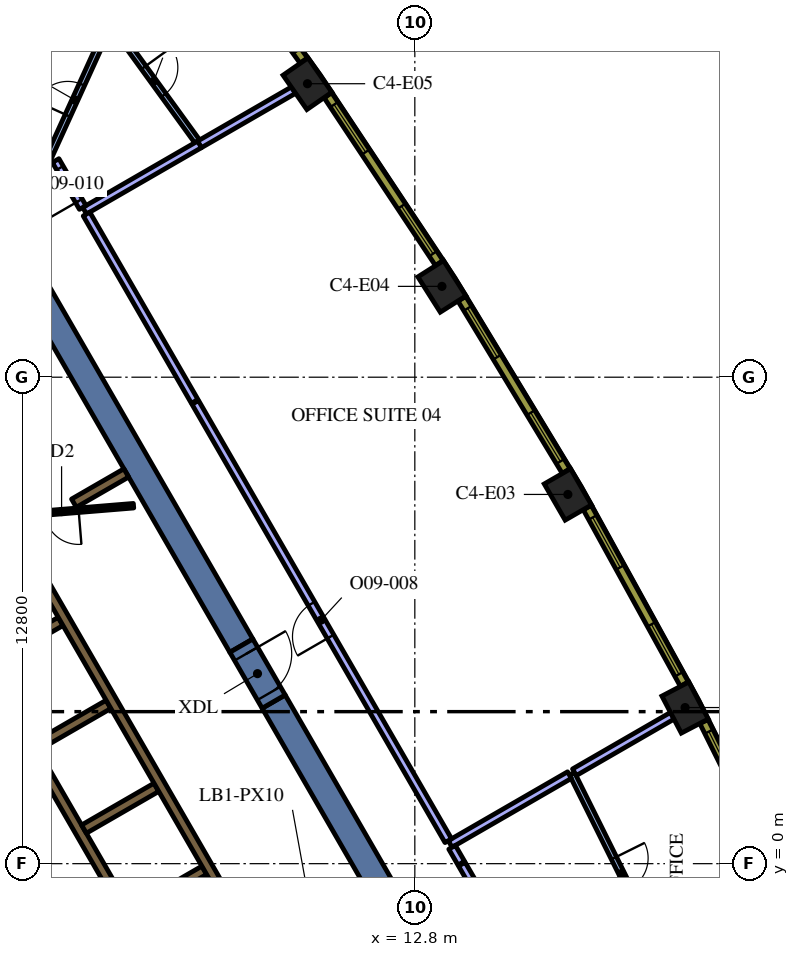
"""IFC4 building model, lengths in metres.
Left out: names, types, materials, properties, quantities, classifications, styles, units other than length and angle.
Written with IfcOpenShell. Run it as: python <this file> out.ifc"""

import sys

from ifc_helpers import new_model, si_unit, direction, frame, frame_2d, origin, origin_2d, place, context, subcontext, project, spatial, rectangle, extrude, element, fill, save


model = new_model("IFC4")
c1 = context("Model", 3, precision=1e-05, world=origin(), true_north=direction((0.0, 1.0)))
c2 = subcontext(c1, "Body", "Model", "MODEL_VIEW")
j1 = project(units=[si_unit("LENGTHUNIT", "METRE"), si_unit("PLANEANGLEUNIT", "RADIAN")], contexts=[c1])
p1 = place(None, origin())
s1 = spatial("IfcSite", under=j1, at=p1, CompositionType="ELEMENT")
p2 = place(p1, origin())
s2 = spatial("IfcBuilding", under=s1, at=p2, CompositionType="ELEMENT")
p3 = place(p2, frame((0.0, 0.0, 239.4)))
s3 = spatial("IfcBuildingStorey", under=s2, at=p3, CompositionType="ELEMENT", Elevation=239.4)
for number, where, z_axis, x_axis in (
    (1, (19.912, 4.108, 0.0), (0.0, 0.0, 1.0), (-0.464, 0.886, 0.0)),
    (2, (16.827, 9.715, 0.0), (0.0, 0.0, 1.0), (-0.5, 0.866, 0.0)),
    (3, (13.513, 15.19, 0.0), (0.0, 0.0, 1.0), (-0.536, 0.845, 0.0)),
    (4, (9.975, 20.522, 0.0), (0.0, 0.0, 1.0), (-0.57, 0.822, 0.0)),
):
    element("IfcColumn", number, at=place(p3, frame(where, z_axis=z_axis, x_axis=x_axis)), inside=s3, PredefinedType="COLUMN", context=c2, shape_type="SweptSolid", body=[
        extrude(rectangle(XDim=1.1, YDim=0.8, at=origin_2d()), origin(), (0.0, 0.0, 1.0), 4.2),
    ])
for number, where, z_axis, x_axis in (
    (5, (9.085, 4.264, 0.0), (0.0, 0.0, 1.0), (0.5, -0.866, 0.0)),
    (6, (8.235, 5.736, 0.0), (0.0, 0.0, 1.0), (-0.5, 0.866, 0.0)),
):
    element("IfcWall", number, at=place(p3, frame(where, z_axis=z_axis, x_axis=x_axis)), inside=s3, PredefinedType="SOLIDWALL", context=c2, shape_type="SweptSolid", body=[
        extrude(rectangle(XDim=12.472, YDim=0.7, at=frame_2d((6.236, 0.0))), origin(), (0.0, 0.0, 1.0), 4.2),
    ])
p4 = place(p3, frame((6.568, -3.627, 0.0), z_axis=(0.0, 0.0, 1.0), x_axis=(-0.499999455981, 0.866025717874, 0.0)))
e7 = element("IfcWall", 7, at=p4, inside=s3, PredefinedType="SOLIDWALL", context=c2, shape_type="SweptSolid", body=[
    extrude(rectangle(XDim=11.978, YDim=0.25, at=frame_2d((5.989, 0.0))), origin(), (0.0, 0.0, 1.0), 4.2),
])
p5 = place(p3, frame((1.574, 5.274, 0.0), z_axis=(0.0, 0.0, 1.0), x_axis=(0.866028486751, 0.499994660107, 0.0)))
e8 = element("IfcWall", 8, at=p5, inside=s3, PredefinedType="SOLIDWALL", context=c2, shape_type="SweptSolid", body=[
    extrude(rectangle(XDim=2.2, YDim=0.25, at=frame_2d((1.1, 0.0))), origin(), (0.0, 0.0, 1.0), 4.2),
])
for number, where, z_axis, x_axis in (
    (9, (2.834, 3.091, 0.0), (0.0, 0.0, 1.0), (0.866, 0.5, 0.0)),
    (10, (4.094, 0.909, 0.0), (0.0, 0.0, 1.0), (0.866, 0.5, 0.0)),
    (11, (5.354, -1.274, 0.0), (0.0, 0.0, 1.0), (0.866, 0.5, 0.0)),
):
    element("IfcWall", number, at=place(p3, frame(where, z_axis=z_axis, x_axis=x_axis)), inside=s3, PredefinedType="SOLIDWALL", context=c2, shape_type="SweptSolid", body=[
        extrude(rectangle(XDim=2.2, YDim=0.25, at=frame_2d((1.1, 0.0))), origin(), (0.0, 0.0, 1.0), 4.2),
    ])
p6 = place(p3, frame((3.83, 9.486, 0.0), z_axis=(0.0, 0.0, 1.0), x_axis=(0.865986202621, 0.500067892261, 0.0)))
e12 = element("IfcWall", 12, at=p6, inside=s3, PredefinedType="SOLIDWALL", context=c2, shape_type="SweptSolid", body=[
    extrude(rectangle(XDim=1.591, YDim=0.25, at=frame_2d((0.795, 0.0))), origin(), (0.0, 0.0, 1.0), 4.2),
])
p7 = place(p3, frame((8.565, -2.185, 0.0), z_axis=(0.0, 0.0, 1.0), x_axis=(-0.499997954832, 0.866026584559, 0.0)))
e13 = element("IfcWall", 13, at=p7, inside=s3, PredefinedType="SOLIDWALL", context=c2, shape_type="SweptSolid", body=[
    extrude(rectangle(XDim=12.35, YDim=0.25, at=frame_2d((6.175, 0.0))), origin(), (0.0, 0.0, 1.0), 4.2),
])
p8 = place(p7, frame((0.585, 0.0, 0.0)))
e14 = element("IfcOpeningElement", 14, at=p8, cuts=e13, PredefinedType="OPENING", context=c2, shape_type="SweptSolid", body=[
    extrude(rectangle(XDim=1.1, YDim=2.1, at=frame_2d((0.55, 1.05))), frame((0.0, 0.135, 0.0), z_axis=(0.0, -1.0, 0.0), x_axis=(1.0, 0.0, 0.0)), (0.0, 0.0, 1.0), 0.27),
])
p9 = place(p3, frame((5.398, 9.419, 0.0), z_axis=(0.0, 0.0, 1.0), x_axis=(-0.996653416376, -0.081743303248, 0.0)))
e15 = element("IfcWall", 15, at=p9, inside=s3, PredefinedType="PARTITIONING", context=c2, shape_type="SweptSolid", body=[
    extrude(rectangle(XDim=2.7, YDim=0.12, at=frame_2d((1.35, 0.0))), origin(), (0.0, 0.0, 1.0), 3.45),
])
p10 = place(p9, frame((1.45, 0.0, 0.0)))
e16 = element("IfcOpeningElement", 16, at=p10, cuts=e15, PredefinedType="OPENING", context=c2, shape_type="SweptSolid", body=[
    extrude(rectangle(XDim=0.9, YDim=2.1, at=frame_2d((0.45, 1.05))), frame((0.0, 0.07, 0.0), z_axis=(0.0, -1.0, 0.0), x_axis=(1.0, 0.0, 0.0)), (0.0, 0.0, 1.0), 0.14),
])
p11 = place(p3, frame((8.235, 5.736, 0.0), z_axis=(0.0, 0.0, 1.0), x_axis=(0.499954529098, -0.86605165483, 0.0)))
e17 = element("IfcWall", 17, at=p11, inside=s3, PredefinedType="SOLIDWALL", context=c2, shape_type="SweptSolid", body=[
    extrude(rectangle(XDim=1.7, YDim=0.7, at=frame_2d((0.85, 0.0))), origin(), (0.0, 0.0, 1.0), 4.2),
])
p12 = place(p11, frame((0.25, 0.0, 0.0)))
e18 = element("IfcOpeningElement", 18, at=p12, cuts=e17, PredefinedType="OPENING", context=c2, shape_type="SweptSolid", body=[
    extrude(rectangle(XDim=1.2, YDim=2.1, at=frame_2d((0.6, 1.05))), frame((0.0, 0.36, 0.0), z_axis=(0.0, -1.0, 0.0), x_axis=(1.0, 0.0, 0.0)), (0.0, 0.0, 1.0), 0.72),
])
p13 = place(p3, frame((16.935, 2.368, 0.0), z_axis=(0.0, 0.0, 1.0), x_axis=(0.445153322039, -0.895454365045, 0.0)))
e19 = element("IfcWall", 19, at=p13, inside=s3, PredefinedType="PARTITIONING", context=c2, shape_type="SweptSolid", body=[
    extrude(rectangle(XDim=5.881, YDim=0.15, at=frame_2d((2.94, 0.0))), origin(), (0.0, 0.0, 1.0), 3.45),
])
p14 = place(p13, frame((2.481, 0.0, 0.0)))
e20 = element("IfcOpeningElement", 20, at=p14, cuts=e19, PredefinedType="OPENING", context=c2, shape_type="SweptSolid", body=[
    extrude(rectangle(XDim=0.9, YDim=2.1, at=frame_2d((0.45, 1.05))), frame((0.0, 0.085, 0.0), z_axis=(0.0, -1.0, 0.0), x_axis=(1.0, 0.0, 0.0)), (0.0, 0.0, 1.0), 0.17),
])
p15 = place(p3, frame((17.0, 2.406, 0.0), z_axis=(0.0, 0.0, 1.0), x_axis=(0.86605561342, 0.499947671726, 0.0)))
e21 = element("IfcWall", 21, at=p15, inside=s3, PredefinedType="PARTITIONING", context=c2, shape_type="SweptSolid", body=[
    extrude(rectangle(XDim=2.971, YDim=0.2, at=frame_2d((1.486, 0.0))), origin(), (0.0, 0.0, 1.0), 3.45),
])
p16 = place(p3, frame((13.731, 0.518, 0.0), z_axis=(0.0, 0.0, 1.0), x_axis=(0.8660128559, 0.500021732944, 0.0)))
e22 = element("IfcWall", 22, at=p16, inside=s3, PredefinedType="PARTITIONING", context=c2, shape_type="SweptSolid", body=[
    extrude(rectangle(XDim=3.625, YDim=0.2, at=frame_2d((1.812, 0.0))), origin(), (0.0, 0.0, 1.0), 3.45),
])
p17 = place(p3, frame((14.022, 0.013, 0.0), z_axis=(0.0, 0.0, 1.0), x_axis=(-0.500159754115, 0.865933150054, 0.0)))
e23 = element("IfcWall", 23, at=p17, inside=s3, PredefinedType="PARTITIONING", context=c2, shape_type="SweptSolid", body=[
    extrude(rectangle(XDim=0.483, YDim=0.2, at=frame_2d((0.242, 0.0))), origin(), (0.0, 0.0, 1.0), 3.45),
])
p18 = place(p3, frame((17.681, -6.324, 0.0), z_axis=(0.0, 0.0, 1.0), x_axis=(-0.50002695829, 0.866009838849, 0.0)))
e24 = element("IfcWall", 24, at=p18, inside=s3, PredefinedType="PARTITIONING", context=c2, shape_type="SweptSolid", body=[
    extrude(rectangle(XDim=7.287, YDim=0.2, at=frame_2d((3.644, 0.0))), origin(), (0.0, 0.0, 1.0), 3.45),
])
p19 = place(p18, frame((3.1, 0.0, 0.0)))
e25 = element("IfcOpeningElement", 25, at=p19, cuts=e24, PredefinedType="OPENING", context=c2, shape_type="SweptSolid", body=[
    extrude(rectangle(XDim=1.0, YDim=2.1, at=frame_2d((0.5, 1.05))), frame((0.0, 0.11, 0.0), z_axis=(0.0, -1.0, 0.0), x_axis=(1.0, 0.0, 0.0)), (0.0, 0.0, 1.0), 0.22),
])
p20 = place(p3, frame((7.128, 18.922, 0.0), z_axis=(0.0, 0.0, 1.0), x_axis=(0.866023575777, 0.500003166188, 0.0)))
e26 = element("IfcWall", 26, at=p20, inside=s3, PredefinedType="PARTITIONING", context=c2, shape_type="SweptSolid", body=[
    extrude(rectangle(XDim=2.861, YDim=0.2, at=frame_2d((1.43, 0.0))), origin(), (0.0, 0.0, 1.0), 3.45),
])
p21 = place(p3, frame((4.111, 17.18, 0.0), z_axis=(0.0, 0.0, 1.0), x_axis=(0.866031916153, 0.499988720078, 0.0)))
e27 = element("IfcWall", 27, at=p21, inside=s3, PredefinedType="PARTITIONING", context=c2, shape_type="SweptSolid", body=[
    extrude(rectangle(XDim=3.492, YDim=0.2, at=frame_2d((1.746, 0.0))), origin(), (0.0, 0.0, 1.0), 3.45),
])
p22 = place(p3, frame((13.681, 0.604, 0.0), z_axis=(0.0, 0.0, 1.0), x_axis=(-0.500001759768, 0.86602438778, 0.0)))
e28 = element("IfcWall", 28, at=p22, inside=s3, PredefinedType="PARTITIONING", context=c2, shape_type="SweptSolid", body=[
    extrude(rectangle(XDim=13.317, YDim=0.2, at=frame_2d((6.658, 0.0))), origin(), (0.0, 0.0, 1.0), 3.45),
])
p23 = place(p22, frame((6.2, 0.0, 0.0)))
e29 = element("IfcOpeningElement", 29, at=p23, cuts=e28, PredefinedType="OPENING", context=c2, shape_type="SweptSolid", body=[
    extrude(rectangle(XDim=1.0, YDim=2.1, at=frame_2d((0.5, 1.05))), frame((0.0, 0.11, 0.0), z_axis=(0.0, -1.0, 0.0), x_axis=(1.0, 0.0, 0.0)), (0.0, 0.0, 1.0), 0.22),
])
p24 = place(p3, frame((7.007, 12.163, 0.0), z_axis=(0.0, 0.0, 1.0), x_axis=(-0.499986040413, 0.866033463206, 0.0)))
e30 = element("IfcWall", 30, at=p24, inside=s3, PredefinedType="PARTITIONING", context=c2, shape_type="SweptSolid", body=[
    extrude(rectangle(XDim=5.693, YDim=0.2, at=frame_2d((2.846, 0.0))), origin(), (0.0, 0.0, 1.0), 3.45),
])
p25 = place(p3, frame((4.791, 22.152, 0.0), z_axis=(0.0, 0.0, 1.0), x_axis=(0.586987127968, -0.809596264567, 0.0)))
e31 = element("IfcWall", 31, at=p25, inside=s3, PredefinedType="PARTITIONING", context=c2, shape_type="SweptSolid", body=[
    extrude(rectangle(XDim=3.887, YDim=0.15, at=frame_2d((1.943, 0.0))), origin(), (0.0, 0.0, 1.0), 3.45),
])
p26 = place(p25, frame((1.487, 0.0, 0.0)))
e32 = element("IfcOpeningElement", 32, at=p26, cuts=e31, PredefinedType="OPENING", context=c2, shape_type="SweptSolid", body=[
    extrude(rectangle(XDim=0.9, YDim=2.1, at=frame_2d((0.45, 1.05))), frame((0.0, 0.085, 0.0), z_axis=(0.0, -1.0, 0.0), x_axis=(1.0, 0.0, 0.0)), (0.0, 0.0, 1.0), 0.17),
])
p27 = place(p3, frame((3.129, 18.5, 0.0), z_axis=(0.0, 0.0, 1.0), x_axis=(0.414332290546, 0.910125679789, 0.0)))
e33 = element("IfcWall", 33, at=p27, inside=s3, PredefinedType="PARTITIONING", context=c2, shape_type="SweptSolid", body=[
    extrude(rectangle(XDim=3.926, YDim=0.15, at=frame_2d((1.963, 0.0))), origin(), (0.0, 0.0, 1.0), 3.45),
])
p28 = place(p27, frame((1.3, 0.0, 0.0)))
e34 = element("IfcOpeningElement", 34, at=p28, cuts=e33, PredefinedType="OPENING", context=c2, shape_type="SweptSolid", body=[
    extrude(rectangle(XDim=0.9, YDim=2.1, at=frame_2d((0.45, 1.05))), frame((0.0, 0.085, 0.0), z_axis=(0.0, -1.0, 0.0), x_axis=(1.0, 0.0, 0.0)), (0.0, 0.0, 1.0), 0.17),
])
p29 = place(p3, frame((4.061, 17.266, 0.0), z_axis=(0.0, 0.0, 1.0), x_axis=(-0.49995489152, 0.866051445611, 0.0)))
e35 = element("IfcWall", 35, at=p29, inside=s3, PredefinedType="PARTITIONING", context=c2, shape_type="SweptSolid", body=[
    extrude(rectangle(XDim=1.425, YDim=0.2, at=frame_2d((0.712, 0.0))), origin(), (0.0, 0.0, 1.0), 3.45),
])
p30 = place(p29, frame((0.2, 0.0, 0.0)))
e36 = element("IfcOpeningElement", 36, at=p30, cuts=e35, PredefinedType="OPENING", context=c2, shape_type="SweptSolid", body=[
    extrude(rectangle(XDim=1.0, YDim=2.1, at=frame_2d((0.5, 1.05))), frame((0.0, 0.11, 0.0), z_axis=(0.0, -1.0, 0.0), x_axis=(1.0, 0.0, 0.0)), (0.0, 0.0, 1.0), 0.22),
])
p31 = place(p3, frame((22.766, -1.005, 0.0), z_axis=(0.0, 0.0, 1.0), x_axis=(-0.445129582031, 0.895466166419, 0.0)))
e37 = element("IfcWall", 37, at=p31, inside=s3, PredefinedType="SOLIDWALL", context=c2, shape_type="SweptSolid", body=[
    extrude(rectangle(XDim=5.298, YDim=0.24, at=frame_2d((2.649, 0.0))), origin(), (0.0, 0.0, 1.0), 3.95),
])
p32 = place(p31, frame((0.295, 0.0, 0.9)))
e38 = element("IfcOpeningElement", 38, at=p32, cuts=e37, PredefinedType="OPENING", context=c2, shape_type="SweptSolid", body=[
    extrude(rectangle(XDim=1.5, YDim=2.55, at=frame_2d((0.75, 1.275))), frame((0.0, 0.13, 0.0), z_axis=(0.0, -1.0, 0.0), x_axis=(1.0, 0.0, 0.0)), (0.0, 0.0, 1.0), 0.26),
])
p33 = place(p31, frame((3.504, 0.0, 0.9)))
e39 = element("IfcOpeningElement", 39, at=p33, cuts=e37, PredefinedType="OPENING", context=c2, shape_type="SweptSolid", body=[
    extrude(rectangle(XDim=1.5, YDim=2.55, at=frame_2d((0.75, 1.275))), frame((0.0, 0.13, 0.0), z_axis=(0.0, -1.0, 0.0), x_axis=(1.0, 0.0, 0.0)), (0.0, 0.0, 1.0), 0.26),
])
p34 = place(p3, frame((19.892, 4.725, 0.0), z_axis=(0.0, 0.0, 1.0), x_axis=(-0.481925825015, 0.876212017256, 0.0)))
e40 = element("IfcWall", 40, at=p34, inside=s3, PredefinedType="SOLIDWALL", context=c2, shape_type="SweptSolid", body=[
    extrude(rectangle(XDim=5.299, YDim=0.24, at=frame_2d((2.649, 0.0))), origin(), (0.0, 0.0, 1.0), 3.95),
])
p35 = place(p34, frame((0.295, 0.0, 0.9)))
e41 = element("IfcOpeningElement", 41, at=p35, cuts=e40, PredefinedType="OPENING", context=c2, shape_type="SweptSolid", body=[
    extrude(rectangle(XDim=1.5, YDim=2.55, at=frame_2d((0.75, 1.275))), frame((0.0, 0.13, 0.0), z_axis=(0.0, -1.0, 0.0), x_axis=(1.0, 0.0, 0.0)), (0.0, 0.0, 1.0), 0.26),
])
p36 = place(p34, frame((3.504, 0.0, 0.9)))
e42 = element("IfcOpeningElement", 42, at=p36, cuts=e40, PredefinedType="OPENING", context=c2, shape_type="SweptSolid", body=[
    extrude(rectangle(XDim=1.5, YDim=2.55, at=frame_2d((0.75, 1.275))), frame((0.0, 0.13, 0.0), z_axis=(0.0, -1.0, 0.0), x_axis=(1.0, 0.0, 0.0)), (0.0, 0.0, 1.0), 0.26),
])
p37 = place(p3, frame((16.782, 10.331, 0.0), z_axis=(0.0, 0.0, 1.0), x_axis=(-0.517846166225, 0.855473756538, 0.0)))
e43 = element("IfcWall", 43, at=p37, inside=s3, PredefinedType="SOLIDWALL", context=c2, shape_type="SweptSolid", body=[
    extrude(rectangle(XDim=5.298, YDim=0.24, at=frame_2d((2.649, 0.0))), origin(), (0.0, 0.0, 1.0), 3.95),
])
p38 = place(p37, frame((0.294, 0.0, 0.9)))
e44 = element("IfcOpeningElement", 44, at=p38, cuts=e43, PredefinedType="OPENING", context=c2, shape_type="SweptSolid", body=[
    extrude(rectangle(XDim=1.5, YDim=2.55, at=frame_2d((0.75, 1.275))), frame((0.0, 0.13, 0.0), z_axis=(0.0, -1.0, 0.0), x_axis=(1.0, 0.0, 0.0)), (0.0, 0.0, 1.0), 0.26),
])
p39 = place(p37, frame((3.504, 0.0, 0.9)))
e45 = element("IfcOpeningElement", 45, at=p39, cuts=e43, PredefinedType="OPENING", context=c2, shape_type="SweptSolid", body=[
    extrude(rectangle(XDim=1.5, YDim=2.55, at=frame_2d((0.75, 1.275))), frame((0.0, 0.13, 0.0), z_axis=(0.0, -1.0, 0.0), x_axis=(1.0, 0.0, 0.0)), (0.0, 0.0, 1.0), 0.26),
])
p40 = place(p3, frame((13.442, 15.803, 0.0), z_axis=(0.0, 0.0, 1.0), x_axis=(-0.552901821755, 0.833246407433, 0.0)))
e46 = element("IfcWall", 46, at=p40, inside=s3, PredefinedType="SOLIDWALL", context=c2, shape_type="SweptSolid", body=[
    extrude(rectangle(XDim=5.298, YDim=0.24, at=frame_2d((2.649, 0.0))), origin(), (0.0, 0.0, 1.0), 3.95),
])
p41 = place(p40, frame((0.295, 0.0, 0.9)))
e47 = element("IfcOpeningElement", 47, at=p41, cuts=e46, PredefinedType="OPENING", context=c2, shape_type="SweptSolid", body=[
    extrude(rectangle(XDim=1.5, YDim=2.55, at=frame_2d((0.75, 1.275))), frame((0.0, 0.13, 0.0), z_axis=(0.0, -1.0, 0.0), x_axis=(1.0, 0.0, 0.0)), (0.0, 0.0, 1.0), 0.26),
])
p42 = place(p40, frame((3.504, 0.0, 0.9)))
e48 = element("IfcOpeningElement", 48, at=p42, cuts=e46, PredefinedType="OPENING", context=c2, shape_type="SweptSolid", body=[
    extrude(rectangle(XDim=1.5, YDim=2.55, at=frame_2d((0.75, 1.275))), frame((0.0, 0.13, 0.0), z_axis=(0.0, -1.0, 0.0), x_axis=(1.0, 0.0, 0.0)), (0.0, 0.0, 1.0), 0.26),
])
p43 = place(p3, frame((9.878, 21.132, 0.0), z_axis=(0.0, 0.0, 1.0), x_axis=(-0.586998456641, 0.80958805074, 0.0)))
e49 = element("IfcWall", 49, at=p43, inside=s3, PredefinedType="SOLIDWALL", context=c2, shape_type="SweptSolid", body=[
    extrude(rectangle(XDim=5.311, YDim=0.24, at=frame_2d((2.655, 0.0))), origin(), (0.0, 0.0, 1.0), 3.95),
])
p44 = place(p43, frame((0.306, 0.0, 0.9)))
e50 = element("IfcOpeningElement", 50, at=p44, cuts=e49, PredefinedType="OPENING", context=c2, shape_type="SweptSolid", body=[
    extrude(rectangle(XDim=1.5, YDim=2.55, at=frame_2d((0.75, 1.275))), frame((0.0, 0.13, 0.0), z_axis=(0.0, -1.0, 0.0), x_axis=(1.0, 0.0, 0.0)), (0.0, 0.0, 1.0), 0.26),
])
p45 = place(p43, frame((3.539, 0.0, 0.9)))
e51 = element("IfcOpeningElement", 51, at=p45, cuts=e49, PredefinedType="OPENING", context=c2, shape_type="SweptSolid", body=[
    extrude(rectangle(XDim=1.5, YDim=2.55, at=frame_2d((0.75, 1.275))), frame((0.0, 0.13, 0.0), z_axis=(0.0, -1.0, 0.0), x_axis=(1.0, 0.0, 0.0)), (0.0, 0.0, 1.0), 0.26),
])
p46 = place(p10, origin())
e52 = element("IfcDoor", 52, at=p46, inside=s3, OperationType="SINGLE_SWING_LEFT", PredefinedType="DOOR", context=c2, shape_type="SweptSolid", body=[
    extrude(rectangle(XDim=0.9, YDim=2.1, at=frame_2d((0.45, 1.05))), frame((0.0, 0.025, 0.0), z_axis=(0.0, -1.0, 0.0), x_axis=(1.0, 0.0, 0.0)), (0.0, 0.0, 1.0), 0.05),
])
fill(e16, e52)
p47 = place(p12, origin())
e53 = element("IfcDoor", 53, at=p47, inside=s3, OperationType="SINGLE_SWING_LEFT", PredefinedType="DOOR", context=c2, shape_type="SweptSolid", body=[
    extrude(rectangle(XDim=1.2, YDim=2.1, at=frame_2d((0.6, 1.05))), frame((0.0, 0.025, 0.0), z_axis=(0.0, -1.0, 0.0), x_axis=(1.0, 0.0, 0.0)), (0.0, 0.0, 1.0), 0.05),
])
fill(e18, e53)
p48 = place(p14, origin())
e54 = element("IfcDoor", 54, at=p48, inside=s3, OperationType="SINGLE_SWING_LEFT", PredefinedType="DOOR", context=c2, shape_type="SweptSolid", body=[
    extrude(rectangle(XDim=0.9, YDim=2.1, at=frame_2d((0.45, 1.05))), frame((0.0, 0.025, 0.0), z_axis=(0.0, -1.0, 0.0), x_axis=(1.0, 0.0, 0.0)), (0.0, 0.0, 1.0), 0.05),
])
fill(e20, e54)
p49 = place(p23, origin())
e55 = element("IfcDoor", 55, at=p49, inside=s3, OperationType="SINGLE_SWING_RIGHT", PredefinedType="DOOR", context=c2, shape_type="SweptSolid", body=[
    extrude(rectangle(XDim=1.0, YDim=2.1, at=frame_2d((0.5, 1.05))), frame((0.0, 0.025, 0.0), z_axis=(0.0, -1.0, 0.0), x_axis=(1.0, 0.0, 0.0)), (0.0, 0.0, 1.0), 0.05),
])
fill(e29, e55)
p50 = place(p26, origin())
e56 = element("IfcDoor", 56, at=p50, inside=s3, OperationType="SINGLE_SWING_LEFT", PredefinedType="DOOR", context=c2, shape_type="SweptSolid", body=[
    extrude(rectangle(XDim=0.9, YDim=2.1, at=frame_2d((0.45, 1.05))), frame((0.0, 0.025, 0.0), z_axis=(0.0, -1.0, 0.0), x_axis=(1.0, 0.0, 0.0)), (0.0, 0.0, 1.0), 0.05),
])
fill(e32, e56)
p51 = place(p30, origin())
e57 = element("IfcDoor", 57, at=p51, inside=s3, OperationType="SINGLE_SWING_LEFT", PredefinedType="DOOR", context=c2, shape_type="SweptSolid", body=[
    extrude(rectangle(XDim=1.0, YDim=2.1, at=frame_2d((0.5, 1.05))), frame((0.0, 0.025, 0.0), z_axis=(0.0, -1.0, 0.0), x_axis=(1.0, 0.0, 0.0)), (0.0, 0.0, 1.0), 0.05),
])
fill(e36, e57)
p52 = place(p28, origin())
e58 = element("IfcDoor", 58, at=p52, inside=s3, OperationType="SINGLE_SWING_LEFT", PredefinedType="DOOR", context=c2, shape_type="SweptSolid", body=[
    extrude(rectangle(XDim=0.9, YDim=2.1, at=frame_2d((0.45, 1.05))), frame((0.0, 0.025, 0.0), z_axis=(0.0, -1.0, 0.0), x_axis=(1.0, 0.0, 0.0)), (0.0, 0.0, 1.0), 0.05),
])
fill(e34, e58)
p53 = place(p33, origin())
e59 = element("IfcWindow", 59, at=p53, inside=s3, PartitioningType="SINGLE_PANEL", PredefinedType="WINDOW", context=c2, shape_type="SweptSolid", body=[
    extrude(rectangle(XDim=1.5, YDim=2.55, at=frame_2d((0.75, 1.275))), frame((0.0, 0.04, 0.0), z_axis=(0.0, -1.0, 0.0), x_axis=(1.0, 0.0, 0.0)), (0.0, 0.0, 1.0), 0.06),
])
fill(e39, e59)
p54 = place(p35, origin())
e60 = element("IfcWindow", 60, at=p54, inside=s3, PartitioningType="SINGLE_PANEL", PredefinedType="WINDOW", context=c2, shape_type="SweptSolid", body=[
    extrude(rectangle(XDim=1.5, YDim=2.55, at=frame_2d((0.75, 1.275))), frame((0.0, 0.04, 0.0), z_axis=(0.0, -1.0, 0.0), x_axis=(1.0, 0.0, 0.0)), (0.0, 0.0, 1.0), 0.06),
])
fill(e41, e60)
p55 = place(p36, origin())
e61 = element("IfcWindow", 61, at=p55, inside=s3, PartitioningType="SINGLE_PANEL", PredefinedType="WINDOW", context=c2, shape_type="SweptSolid", body=[
    extrude(rectangle(XDim=1.5, YDim=2.55, at=frame_2d((0.75, 1.275))), frame((0.0, 0.04, 0.0), z_axis=(0.0, -1.0, 0.0), x_axis=(1.0, 0.0, 0.0)), (0.0, 0.0, 1.0), 0.06),
])
fill(e42, e61)
p56 = place(p38, origin())
e62 = element("IfcWindow", 62, at=p56, inside=s3, PartitioningType="SINGLE_PANEL", PredefinedType="WINDOW", context=c2, shape_type="SweptSolid", body=[
    extrude(rectangle(XDim=1.5, YDim=2.55, at=frame_2d((0.75, 1.275))), frame((0.0, 0.04, 0.0), z_axis=(0.0, -1.0, 0.0), x_axis=(1.0, 0.0, 0.0)), (0.0, 0.0, 1.0), 0.06),
])
fill(e44, e62)
p57 = place(p39, origin())
e63 = element("IfcWindow", 63, at=p57, inside=s3, PartitioningType="SINGLE_PANEL", PredefinedType="WINDOW", context=c2, shape_type="SweptSolid", body=[
    extrude(rectangle(XDim=1.5, YDim=2.55, at=frame_2d((0.75, 1.275))), frame((0.0, 0.04, 0.0), z_axis=(0.0, -1.0, 0.0), x_axis=(1.0, 0.0, 0.0)), (0.0, 0.0, 1.0), 0.06),
])
fill(e45, e63)
p58 = place(p41, origin())
e64 = element("IfcWindow", 64, at=p58, inside=s3, PartitioningType="SINGLE_PANEL", PredefinedType="WINDOW", context=c2, shape_type="SweptSolid", body=[
    extrude(rectangle(XDim=1.5, YDim=2.55, at=frame_2d((0.75, 1.275))), frame((0.0, 0.04, 0.0), z_axis=(0.0, -1.0, 0.0), x_axis=(1.0, 0.0, 0.0)), (0.0, 0.0, 1.0), 0.06),
])
fill(e47, e64)
p59 = place(p42, origin())
e65 = element("IfcWindow", 65, at=p59, inside=s3, PartitioningType="SINGLE_PANEL", PredefinedType="WINDOW", context=c2, shape_type="SweptSolid", body=[
    extrude(rectangle(XDim=1.5, YDim=2.55, at=frame_2d((0.75, 1.275))), frame((0.0, 0.04, 0.0), z_axis=(0.0, -1.0, 0.0), x_axis=(1.0, 0.0, 0.0)), (0.0, 0.0, 1.0), 0.06),
])
fill(e48, e65)
save(model, sys.argv[1])
